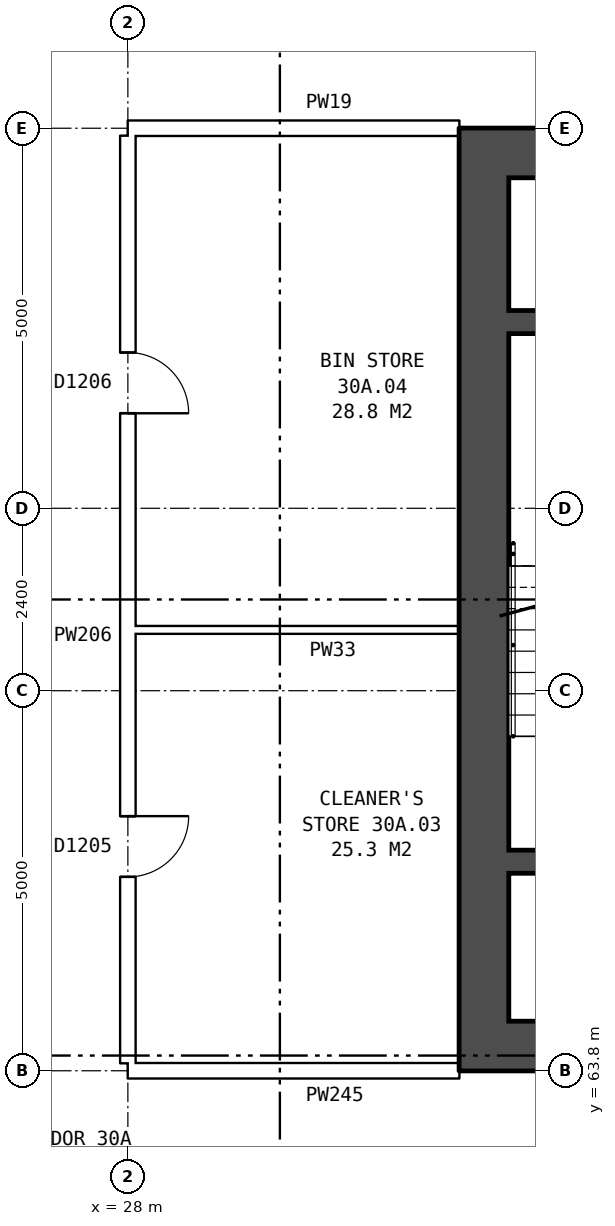
"""IFC4 building model, lengths in metres.
Left out: names, types, materials, properties, quantities, classifications, styles, units other than length and angle.
Written with IfcOpenShell. Run it as: python <this file> out.ifc"""

import sys

from ifc_helpers import new_model, si_unit, direction, frame, frame_2d, origin, place, context, subcontext, project, spatial, rectangle, extrude, element, fill, save


model = new_model("IFC4")
c1 = context("Model", 3, precision=1e-05, world=origin(), true_north=direction((0.0, 1.0)))
c2 = subcontext(c1, "Body", "Model", "MODEL_VIEW")
j1 = project(units=[si_unit("LENGTHUNIT", "METRE"), si_unit("PLANEANGLEUNIT", "RADIAN")], contexts=[c1])
p1 = place(None, origin())
s1 = spatial("IfcSite", under=j1, at=p1, CompositionType="ELEMENT")
p2 = place(p1, origin())
s2 = spatial("IfcBuilding", under=s1, at=p2, CompositionType="ELEMENT")
p3 = place(p2, frame((0.0, 0.0, 108.8)))
s3 = spatial("IfcBuildingStorey", under=s2, at=p3, CompositionType="ELEMENT", Elevation=108.8)
p4 = place(p3, frame((32.685, 75.55, 0.0), z_axis=(0.0, 0.0, 1.0), x_axis=(0.0, -1.0, 0.0)))
e1 = element("IfcWall", 1, at=p4, inside=s3, PredefinedType="SHEAR", context=c2, shape_type="SweptSolid", body=[
    extrude(rectangle(XDim=11.1, YDim=0.65, at=frame_2d((5.55, 0.0))), origin(), (0.0, 0.0, 1.0), 2.85),
])
for number, where, z_axis, x_axis in (
    (2, (41.36, 75.875, 0.0), (0.0, 0.0, 1.0), (-1.0, 0.0, 0.0)),
    (3, (41.36, 64.125, 0.0), (0.0, 0.0, 1.0), (-1.0, 0.0, 0.0)),
):
    element("IfcWall", number, at=place(p3, frame(where, z_axis=z_axis, x_axis=x_axis)), inside=s3, PredefinedType="SHEAR", context=c2, shape_type="SweptSolid", body=[
        extrude(rectangle(XDim=9.0, YDim=0.65, at=frame_2d((4.5, 0.0))), origin(), (0.0, 0.0, 1.0), 2.85),
    ])
p5 = place(p3, frame((36.06, 73.65, 0.0), z_axis=(0.0, 0.0, 1.0), x_axis=(-1.0, 0.0, 0.0)))
e4 = element("IfcWall", 4, at=p5, inside=s3, PredefinedType="SHEAR", context=c2, shape_type="SweptSolid", body=[
    extrude(rectangle(XDim=3.05, YDim=0.3, at=frame_2d((1.525, 0.0))), origin(), (0.0, 0.0, 1.0), 2.85),
])
p6 = place(p3, frame((36.06, 66.55, 0.0), z_axis=(0.0, 0.0, 1.0), x_axis=(-1.0, 0.0, 0.0)))
e5 = element("IfcWall", 5, at=p6, inside=s3, PredefinedType="SHEAR", context=c2, shape_type="SweptSolid", body=[
    extrude(rectangle(XDim=3.05, YDim=0.3, at=frame_2d((1.525, 0.0))), origin(), (0.0, 0.0, 1.0), 2.85),
])
p7 = place(p6, frame((0.17, 0.0, 0.0)))
e6 = element("IfcOpeningElement", 6, at=p7, cuts=e5, PredefinedType="OPENING", context=c2, shape_type="SweptSolid", body=[
    extrude(rectangle(XDim=1.1, YDim=2.1, at=frame_2d((0.55, 1.05))), frame((0.0, 0.16, 0.0), z_axis=(0.0, -1.0, 0.0), x_axis=(1.0, 0.0, 0.0)), (0.0, 0.0, 1.0), 0.32),
])
p8 = place(p3, frame((28.0, 63.8, 0.0), z_axis=(0.0, 0.0, 1.0), x_axis=(1.0, 0.0, 0.0)))
e7 = element("IfcWall", 7, at=p8, inside=s3, PredefinedType="PARTITIONING", context=c2, shape_type="SweptSolid", body=[
    extrude(rectangle(XDim=4.36, YDim=0.2, at=frame_2d((2.18, 0.0))), origin(), (0.0, 0.0, 1.0), 2.85),
])
p9 = place(p3, frame((28.1, 69.6, 0.0), z_axis=(0.0, 0.0, 1.0), x_axis=(1.0, 0.0, 0.0)))
e8 = element("IfcWall", 8, at=p9, inside=s3, PredefinedType="PARTITIONING", context=c2, shape_type="SweptSolid", body=[
    extrude(rectangle(XDim=4.26, YDim=0.1, at=frame_2d((2.13, 0.0))), origin(), (0.0, 0.0, 1.0), 2.85),
])
p10 = place(p3, frame((28.0, 76.2, 0.0), z_axis=(0.0, 0.0, 1.0), x_axis=(1.0, 0.0, 0.0)))
e9 = element("IfcWall", 9, at=p10, inside=s3, PredefinedType="PARTITIONING", context=c2, shape_type="SweptSolid", body=[
    extrude(rectangle(XDim=4.36, YDim=0.2, at=frame_2d((2.18, 0.0))), origin(), (0.0, 0.0, 1.0), 2.85),
])
p11 = place(p3, frame((28.0, 63.9, 0.0), z_axis=(0.0, 0.0, 1.0), x_axis=(0.0, 1.0, 0.0)))
e10 = element("IfcWall", 10, at=p11, inside=s3, PredefinedType="PARTITIONING", context=c2, shape_type="SweptSolid", body=[
    extrude(rectangle(XDim=12.2, YDim=0.2, at=frame_2d((6.1, 0.0))), origin(), (0.0, 0.0, 1.0), 2.85),
])
p12 = place(p11, frame((2.45, 0.0, 0.0)))
e11 = element("IfcOpeningElement", 11, at=p12, cuts=e10, PredefinedType="OPENING", context=c2, shape_type="SweptSolid", body=[
    extrude(rectangle(XDim=0.8, YDim=2.1, at=frame_2d((0.4, 1.05))), frame((0.0, 0.11, 0.0), z_axis=(0.0, -1.0, 0.0), x_axis=(1.0, 0.0, 0.0)), (0.0, 0.0, 1.0), 0.22),
])
p13 = place(p11, frame((8.55, 0.0, 0.0)))
e12 = element("IfcOpeningElement", 12, at=p13, cuts=e10, PredefinedType="OPENING", context=c2, shape_type="SweptSolid", body=[
    extrude(rectangle(XDim=0.8, YDim=2.1, at=frame_2d((0.4, 1.05))), frame((0.0, 0.11, 0.0), z_axis=(0.0, -1.0, 0.0), x_axis=(1.0, 0.0, 0.0)), (0.0, 0.0, 1.0), 0.22),
])
p14 = place(p12, frame((0.8, 0.0, 0.0), z_axis=(0.0, 0.0, 1.0), x_axis=(-1.0, 0.0, 0.0)))
e13 = element("IfcDoor", 13, at=p14, inside=s3, OperationType="SINGLE_SWING_LEFT", PredefinedType="DOOR", context=c2, shape_type="SweptSolid", body=[
    extrude(rectangle(XDim=0.8, YDim=2.1, at=frame_2d((0.4, 1.05))), frame((0.0, 0.025, 0.0), z_axis=(0.0, -1.0, 0.0), x_axis=(1.0, 0.0, 0.0)), (0.0, 0.0, 1.0), 0.05),
])
fill(e11, e13)
p15 = place(p13, frame((0.8, 0.0, 0.0), z_axis=(0.0, 0.0, 1.0), x_axis=(-1.0, 0.0, 0.0)))
e14 = element("IfcDoor", 14, at=p15, inside=s3, OperationType="SINGLE_SWING_RIGHT", PredefinedType="DOOR", context=c2, shape_type="SweptSolid", body=[
    extrude(rectangle(XDim=0.8, YDim=2.1, at=frame_2d((0.4, 1.05))), frame((0.0, 0.025, 0.0), z_axis=(0.0, -1.0, 0.0), x_axis=(1.0, 0.0, 0.0)), (0.0, 0.0, 1.0), 0.05),
])
fill(e12, e14)
save(model, sys.argv[1])
